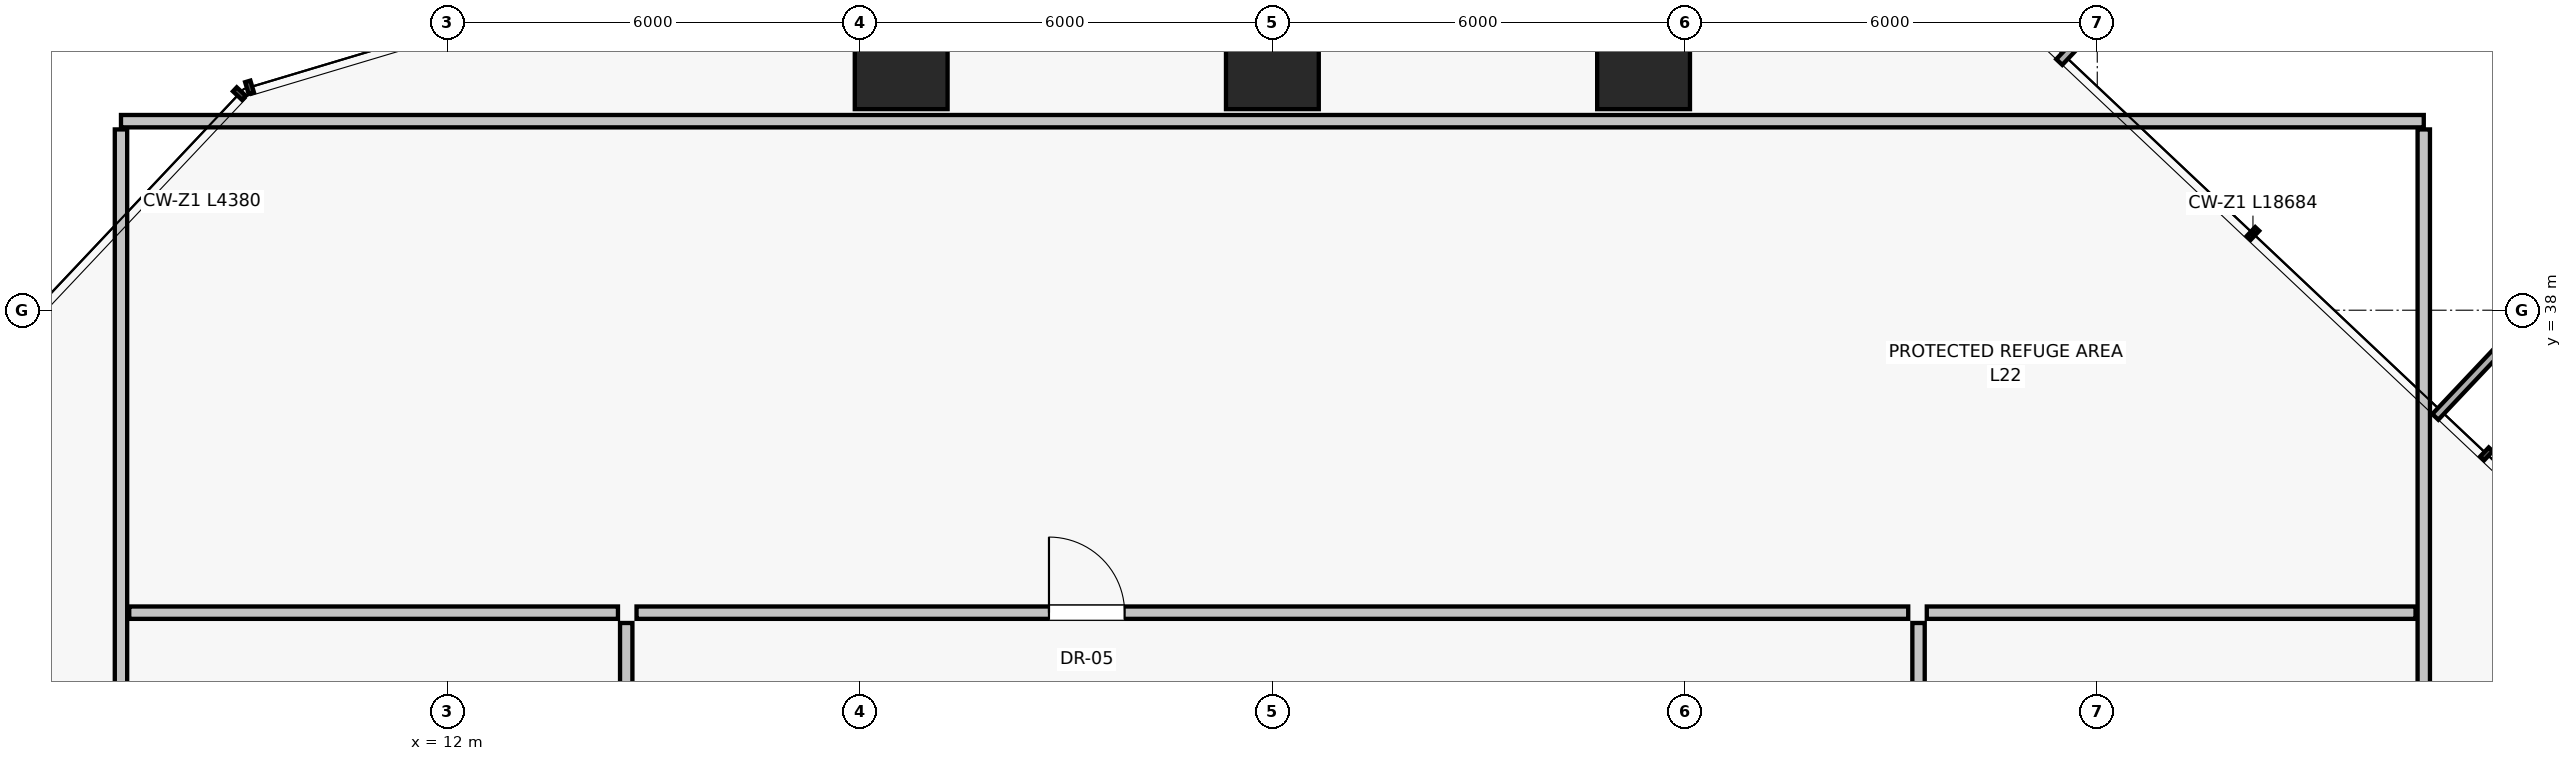
"""IFC4 building model, lengths in metres.
Left out: names, types, materials, properties, quantities, classifications, styles, units other than length and angle.
Written with IfcOpenShell. Run it as: python <this file> out.ifc"""

import sys

from ifc_helpers import new_model, si_unit, direction, frame, frame_2d, origin, origin_2d, place, context, subcontext, project, spatial, rectangle, extrude, source, transform, mapped, element, fill, save


model = new_model("IFC4")
c1 = context("Model", 3, precision=1e-05, world=origin(), true_north=direction((0.0, 1.0)))
c2 = subcontext(c1, "Body", "Model", "MODEL_VIEW")
j1 = project(units=[si_unit("LENGTHUNIT", "METRE"), si_unit("PLANEANGLEUNIT", "RADIAN")], contexts=[c1])
p1 = place(None, origin())
s1 = spatial("IfcSite", under=j1, at=p1, CompositionType="ELEMENT")
p2 = place(p1, origin())
s2 = spatial("IfcBuilding", under=s1, at=p2, CompositionType="ELEMENT")
p3 = place(p2, frame((0.0, 0.0, 80.35)))
s3 = spatial("IfcBuildingStorey", under=s2, at=p3, CompositionType="ELEMENT", Elevation=80.35)
for number, where, z_axis, x_axis in (
    (1, (29.4, 41.6, 0.0), (0.0, 0.0, 1.0), (1.0, 0.0, 0.0)),
    (2, (24.0, 41.6, 0.0), (0.0, 0.0, 1.0), (1.0, 0.0, 0.0)),
    (3, (18.6, 41.6, 0.0), (0.0, 0.0, 1.0), (1.0, 0.0, 0.0)),
):
    element("IfcColumn", number, at=place(p3, frame(where, z_axis=z_axis, x_axis=x_axis)), inside=s3, PredefinedType="COLUMN", context=c2, shape_type="SweptSolid", body=[
        extrude(rectangle(XDim=1.35, YDim=1.35, at=origin_2d()), origin(), (0.0, 0.0, 1.0), 4.8),
    ])
p4 = place(p3, frame((33.4, 14.35, 0.0), z_axis=(0.0, 0.0, 1.0), x_axis=(0.0, 1.0, 0.0)))
e4 = element("IfcWall", 4, at=p4, inside=s3, PredefinedType="PARTITIONING", context=c2, shape_type="SweptSolid", body=[
    extrude(rectangle(XDim=19.1, YDim=0.18, at=frame_2d((9.55, 0.0))), origin(), (0.0, 0.0, 1.0), 4.48),
])
p5 = place(p4, frame((6.0, 0.0, 0.0)))
e5 = element("IfcOpeningElement", 5, at=p5, cuts=e4, PredefinedType="OPENING", context=c2, shape_type="SweptSolid", body=[
    extrude(rectangle(XDim=1.3, YDim=2.3, at=frame_2d((0.65, 1.15))), frame((0.0, 0.1, 0.0), z_axis=(0.0, -1.0, 0.0), x_axis=(1.0, 0.0, 0.0)), (0.0, 0.0, 1.0), 0.2),
])
p6 = place(p3, frame((14.75, 33.6, 0.0), z_axis=(0.0, 0.0, 1.0), x_axis=(1.0, 0.0, 0.0)))
e6 = element("IfcWall", 6, at=p6, inside=s3, PredefinedType="PARTITIONING", context=c2, shape_type="SweptSolid", body=[
    extrude(rectangle(XDim=18.5, YDim=0.18, at=frame_2d((9.25, 0.0))), origin(), (0.0, 0.0, 1.0), 4.48),
])
p7 = place(p6, frame((6.0, 0.0, 0.0)))
e7 = element("IfcOpeningElement", 7, at=p7, cuts=e6, PredefinedType="OPENING", context=c2, shape_type="SweptSolid", body=[
    extrude(rectangle(XDim=1.1, YDim=2.03, at=frame_2d((0.55, 1.015))), frame((0.0, 0.1, 0.0), z_axis=(0.0, -1.0, 0.0), x_axis=(1.0, 0.0, 0.0)), (0.0, 0.0, 1.0), 0.2),
])
p8 = place(p3, frame((14.6, 14.35, 0.0), z_axis=(0.0, 0.0, 1.0), x_axis=(0.0, 1.0, 0.0)))
e8 = element("IfcWall", 8, at=p8, inside=s3, PredefinedType="PARTITIONING", context=c2, shape_type="SweptSolid", body=[
    extrude(rectangle(XDim=19.1, YDim=0.18, at=frame_2d((9.55, 0.0))), origin(), (0.0, 0.0, 1.0), 4.48),
])
p9 = place(p8, frame((6.0, 0.0, 0.0)))
e9 = element("IfcOpeningElement", 9, at=p9, cuts=e8, PredefinedType="OPENING", context=c2, shape_type="SweptSolid", body=[
    extrude(rectangle(XDim=1.3, YDim=2.3, at=frame_2d((0.65, 1.15))), frame((0.0, 0.1, 0.0), z_axis=(0.0, -1.0, 0.0), x_axis=(1.0, 0.0, 0.0)), (0.0, 0.0, 1.0), 0.2),
])
p10 = place(p3, frame((7.25, 40.75, 0.0), z_axis=(0.0, 0.0, 1.0), x_axis=(1.0, 0.0, 0.0)))
e10 = element("IfcWall", 10, at=p10, inside=s3, PredefinedType="PARTITIONING", context=c2, shape_type="SweptSolid", body=[
    extrude(rectangle(XDim=33.5, YDim=0.18, at=frame_2d((16.75, 0.0))), origin(), (0.0, 0.0, 1.0), 4.48),
])
for number, where, z_axis, x_axis in (
    (11, (7.25, 7.37, 0.0), (0.0, 0.0, 1.0), (0.0, 1.0, 0.0)),
    (12, (40.75, 7.37, 0.0), (0.0, 0.0, 1.0), (0.0, 1.0, 0.0)),
):
    element("IfcWall", number, at=place(p3, frame(where, z_axis=z_axis, x_axis=x_axis)), inside=s3, PredefinedType="PARTITIONING", context=c2, shape_type="SweptSolid", body=[
        extrude(rectangle(XDim=33.26, YDim=0.18, at=frame_2d((16.63, 0.0))), origin(), (0.0, 0.0, 1.0), 2.28),
    ])
for number, where, z_axis, x_axis in (
    (13, (7.37, 33.6, 0.0), (0.0, 0.0, 1.0), (1.0, 0.0, 0.0)),
    (14, (33.52, 33.6, 0.0), (0.0, 0.0, 1.0), (1.0, 0.0, 0.0)),
):
    element("IfcWall", number, at=place(p3, frame(where, z_axis=z_axis, x_axis=x_axis)), inside=s3, PredefinedType="PARTITIONING", context=c2, shape_type="SweptSolid", body=[
        extrude(rectangle(XDim=7.11, YDim=0.18, at=frame_2d((3.555, 0.0))), origin(), (0.0, 0.0, 1.0), 4.48),
    ])
m1 = source(origin(), c2, "Body", "SweptSolid", [
    extrude(rectangle(XDim=1.1, YDim=2.03, at=frame_2d((0.55, 1.015))), frame((0.0, 0.025, 0.0), z_axis=(0.0, -1.0, 0.0), x_axis=(1.0, 0.0, 0.0)), (0.0, 0.0, 1.0), 0.05),
])
p11 = place(p7, origin())
e15 = element("IfcDoor", 15, at=p11, inside=s3, OperationType="SINGLE_SWING_LEFT", PredefinedType="DOOR", context=c2, shape_type="MappedRepresentation", body=[
    mapped(m1, transform((0.0, 0.0, 0.0), scale=1.0)),
])
fill(e7, e15)
save(model, sys.argv[1])
